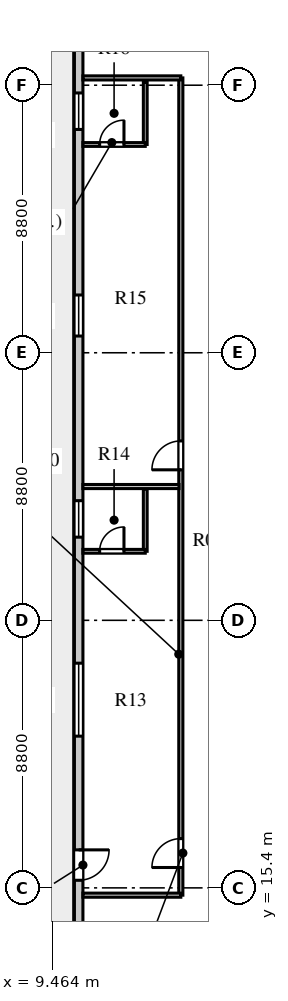
"""IFC4 building model, lengths in metres.
Left out: names, types, materials, properties, quantities, classifications, styles, units other than length and angle.
Written with IfcOpenShell. Run it as: python <this file> out.ifc"""

import sys

from ifc_helpers import new_model, si_unit, direction, frame, frame_2d, origin, place, context, subcontext, project, spatial, rectangle, extrude, element, fill, save


model = new_model("IFC4")
c1 = context("Model", 3, precision=1e-05, world=origin(), true_north=direction((0.0, 1.0)))
c2 = subcontext(c1, "Body", "Model", "MODEL_VIEW")
j1 = project(units=[si_unit("LENGTHUNIT", "METRE"), si_unit("PLANEANGLEUNIT", "RADIAN")], contexts=[c1])
p1 = place(None, origin())
s1 = spatial("IfcSite", under=j1, at=p1, CompositionType="ELEMENT")
p2 = place(p1, origin())
s2 = spatial("IfcBuilding", under=s1, at=p2, CompositionType="ELEMENT")
p3 = place(p2, frame((0.0, 0.0, 119.4)))
s3 = spatial("IfcBuildingStorey", under=s2, at=p3, CompositionType="ELEMENT", Elevation=119.4)
p4 = place(p3, frame((10.34, 43.87, 0.0), z_axis=(0.0, 0.0, 1.0), x_axis=(0.0, -1.0, 0.0)))
e1 = element("IfcWall", 1, at=p4, inside=s3, PredefinedType="STANDARD", context=c2, shape_type="SweptSolid", body=[
    extrude(rectangle(XDim=30.54, YDim=0.28, at=frame_2d((15.27, 0.0))), origin(), (0.0, 0.0, 1.0), 3.6),
])
p5 = place(p4, frame((27.22, 0.0, 0.0)))
e2 = element("IfcOpeningElement", 2, at=p5, cuts=e1, PredefinedType="OPENING", context=c2, shape_type="SweptSolid", body=[
    extrude(rectangle(XDim=1.0, YDim=2.05, at=frame_2d((0.5, 1.025))), frame((0.0, 0.15, 0.0), z_axis=(0.0, -1.0, 0.0), x_axis=(1.0, 0.0, 0.0)), (0.0, 0.0, 1.0), 0.3),
])
p6 = place(p4, frame((21.08, 0.0, 0.8)))
e3 = element("IfcOpeningElement", 3, at=p6, cuts=e1, PredefinedType="OPENING", context=c2, shape_type="SweptSolid", body=[
    extrude(rectangle(XDim=2.4, YDim=2.05, at=frame_2d((1.2, 1.025))), frame((0.0, 0.15, 0.0), z_axis=(0.0, -1.0, 0.0), x_axis=(1.0, 0.0, 0.0)), (0.0, 0.0, 1.0), 0.3),
])
p7 = place(p4, frame((15.735, 0.0, 0.8)))
e4 = element("IfcOpeningElement", 4, at=p7, cuts=e1, PredefinedType="OPENING", context=c2, shape_type="SweptSolid", body=[
    extrude(rectangle(XDim=1.2, YDim=1.75, at=frame_2d((0.6, 0.875))), frame((0.0, 0.15, 0.0), z_axis=(0.0, -1.0, 0.0), x_axis=(1.0, 0.0, 0.0)), (0.0, 0.0, 1.0), 0.3),
])
p8 = place(p4, frame((8.97, 0.0, 0.8)))
e5 = element("IfcOpeningElement", 5, at=p8, cuts=e1, PredefinedType="OPENING", context=c2, shape_type="SweptSolid", body=[
    extrude(rectangle(XDim=1.35, YDim=1.9, at=frame_2d((0.675, 0.95))), frame((0.0, 0.15, 0.0), z_axis=(0.0, -1.0, 0.0), x_axis=(1.0, 0.0, 0.0)), (0.0, 0.0, 1.0), 0.3),
])
p9 = place(p4, frame((2.325, 0.0, 0.8)))
e6 = element("IfcOpeningElement", 6, at=p9, cuts=e1, PredefinedType="OPENING", context=c2, shape_type="SweptSolid", body=[
    extrude(rectangle(XDim=1.2, YDim=1.75, at=frame_2d((0.6, 0.875))), frame((0.0, 0.15, 0.0), z_axis=(0.0, -1.0, 0.0), x_axis=(1.0, 0.0, 0.0)), (0.0, 0.0, 1.0), 0.3),
])
p10 = place(p3, frame((13.7, 15.16, 0.0), z_axis=(0.0, 0.0, 1.0), x_axis=(0.0, 1.0, 0.0)))
e7 = element("IfcWall", 7, at=p10, inside=s3, PredefinedType="PARTITIONING", context=c2, shape_type="SweptSolid", body=[
    extrude(rectangle(XDim=26.88, YDim=0.135, at=frame_2d((13.44, 0.0))), origin(), (0.0, 0.0, 1.0), 3.6),
])
p11 = place(p10, frame((0.91, 0.0, 0.0)))
e8 = element("IfcOpeningElement", 8, at=p11, cuts=e7, PredefinedType="OPENING", context=c2, shape_type="SweptSolid", body=[
    extrude(rectangle(XDim=0.95, YDim=2.1, at=frame_2d((0.475, 1.05))), frame((0.0, 0.078, 0.0), z_axis=(0.0, -1.0, 0.0), x_axis=(1.0, 0.0, 0.0)), (0.0, 0.0, 1.0), 0.155),
])
p12 = place(p10, frame((13.99, 0.0, 0.0)))
e9 = element("IfcOpeningElement", 9, at=p12, cuts=e7, PredefinedType="OPENING", context=c2, shape_type="SweptSolid", body=[
    extrude(rectangle(XDim=0.95, YDim=2.1, at=frame_2d((0.475, 1.05))), frame((0.0, 0.078, 0.0), z_axis=(0.0, -1.0, 0.0), x_axis=(1.0, 0.0, 0.0)), (0.0, 0.0, 1.0), 0.155),
])
for number, where, z_axis, x_axis in (
    (10, (10.48, 15.16, 0.0), (0.0, 0.0, 1.0), (1.0, 0.0, 0.0)),
    (11, (10.48, 42.04, 0.0), (0.0, 0.0, 1.0), (1.0, 0.0, 0.0)),
):
    element("IfcWall", number, at=place(p3, frame(where, z_axis=z_axis, x_axis=x_axis)), inside=s3, PredefinedType="PARTITIONING", context=c2, shape_type="SweptSolid", body=[
        extrude(rectangle(XDim=3.22, YDim=0.135, at=frame_2d((1.61, 0.0))), origin(), (0.0, 0.0, 1.0), 3.1),
    ])
p13 = place(p3, frame((12.53, 26.47, 0.0), z_axis=(0.0, 0.0, 1.0), x_axis=(0.0, 1.0, 0.0)))
e12 = element("IfcWall", 12, at=p13, inside=s3, PredefinedType="PLUMBINGWALL", context=c2, shape_type="SweptSolid", body=[
    extrude(rectangle(XDim=2.05, YDim=0.125, at=frame_2d((1.025, 0.0))), origin(), (0.0, 0.0, 1.0), 3.6),
])
p14 = place(p3, frame((10.48, 26.47, 0.0), z_axis=(0.0, 0.0, 1.0), x_axis=(1.0, 0.0, 0.0)))
e13 = element("IfcWall", 13, at=p14, inside=s3, PredefinedType="PLUMBINGWALL", context=c2, shape_type="SweptSolid", body=[
    extrude(rectangle(XDim=2.05, YDim=0.125, at=frame_2d((1.025, 0.0))), origin(), (0.0, 0.0, 1.0), 3.6),
])
p15 = place(p14, frame((0.55, 0.0, 0.0)))
e14 = element("IfcOpeningElement", 14, at=p15, cuts=e13, PredefinedType="OPENING", context=c2, shape_type="SweptSolid", body=[
    extrude(rectangle(XDim=0.8, YDim=2.05, at=frame_2d((0.4, 1.025))), frame((0.0, 0.073, 0.0), z_axis=(0.0, -1.0, 0.0), x_axis=(1.0, 0.0, 0.0)), (0.0, 0.0, 1.0), 0.145),
])
p16 = place(p3, frame((10.48, 28.6, 0.0), z_axis=(0.0, 0.0, 1.0), x_axis=(1.0, 0.0, 0.0)))
e15 = element("IfcWall", 15, at=p16, inside=s3, PredefinedType="PARTITIONING", context=c2, shape_type="SweptSolid", body=[
    extrude(rectangle(XDim=3.16, YDim=0.135, at=frame_2d((1.58, 0.0))), origin(), (0.0, 0.0, 1.0), 3.6),
])
p17 = place(p3, frame((12.53, 39.85, 0.0), z_axis=(0.0, 0.0, 1.0), x_axis=(0.0, 1.0, 0.0)))
e16 = element("IfcWall", 16, at=p17, inside=s3, PredefinedType="PLUMBINGWALL", context=c2, shape_type="SweptSolid", body=[
    extrude(rectangle(XDim=2.05, YDim=0.125, at=frame_2d((1.025, 0.0))), origin(), (0.0, 0.0, 1.0), 3.6),
])
p18 = place(p3, frame((10.48, 39.85, 0.0), z_axis=(0.0, 0.0, 1.0), x_axis=(1.0, 0.0, 0.0)))
e17 = element("IfcWall", 17, at=p18, inside=s3, PredefinedType="PLUMBINGWALL", context=c2, shape_type="SweptSolid", body=[
    extrude(rectangle(XDim=2.05, YDim=0.125, at=frame_2d((1.025, 0.0))), origin(), (0.0, 0.0, 1.0), 3.6),
])
p19 = place(p18, frame((0.55, 0.0, 0.0)))
e18 = element("IfcOpeningElement", 18, at=p19, cuts=e17, PredefinedType="OPENING", context=c2, shape_type="SweptSolid", body=[
    extrude(rectangle(XDim=0.8, YDim=2.05, at=frame_2d((0.4, 1.025))), frame((0.0, 0.073, 0.0), z_axis=(0.0, -1.0, 0.0), x_axis=(1.0, 0.0, 0.0)), (0.0, 0.0, 1.0), 0.145),
])
p20 = place(p5, frame((1.0, 0.0, 0.0), z_axis=(0.0, 0.0, 1.0), x_axis=(-1.0, 0.0, 0.0)))
e19 = element("IfcDoor", 19, at=p20, inside=s3, OperationType="SINGLE_SWING_RIGHT", PredefinedType="DOOR", context=c2, shape_type="SweptSolid", body=[
    extrude(rectangle(XDim=1.0, YDim=2.05, at=frame_2d((0.5, 1.025))), frame((0.0, 0.025, 0.0), z_axis=(0.0, -1.0, 0.0), x_axis=(1.0, 0.0, 0.0)), (0.0, 0.0, 1.0), 0.05),
])
fill(e2, e19)
p21 = place(p6, origin())
e20 = element("IfcWindow", 20, at=p21, inside=s3, PartitioningType="SINGLE_PANEL", PredefinedType="WINDOW", context=c2, shape_type="SweptSolid", body=[
    extrude(rectangle(XDim=2.4, YDim=2.05, at=frame_2d((1.2, 1.025))), frame((0.0, 0.03, 0.0), z_axis=(0.0, -1.0, 0.0), x_axis=(1.0, 0.0, 0.0)), (0.0, 0.0, 1.0), 0.06),
])
fill(e3, e20)
p22 = place(p7, origin())
e21 = element("IfcWindow", 21, at=p22, inside=s3, PartitioningType="SINGLE_PANEL", PredefinedType="WINDOW", context=c2, shape_type="SweptSolid", body=[
    extrude(rectangle(XDim=1.2, YDim=1.75, at=frame_2d((0.6, 0.875))), frame((0.0, 0.03, 0.0), z_axis=(0.0, -1.0, 0.0), x_axis=(1.0, 0.0, 0.0)), (0.0, 0.0, 1.0), 0.06),
])
fill(e4, e21)
p23 = place(p8, origin())
e22 = element("IfcWindow", 22, at=p23, inside=s3, PartitioningType="SINGLE_PANEL", PredefinedType="WINDOW", context=c2, shape_type="SweptSolid", body=[
    extrude(rectangle(XDim=1.35, YDim=1.9, at=frame_2d((0.675, 0.95))), frame((0.0, 0.03, 0.0), z_axis=(0.0, -1.0, 0.0), x_axis=(1.0, 0.0, 0.0)), (0.0, 0.0, 1.0), 0.06),
])
fill(e5, e22)
p24 = place(p9, origin())
e23 = element("IfcWindow", 23, at=p24, inside=s3, PartitioningType="SINGLE_PANEL", PredefinedType="WINDOW", context=c2, shape_type="SweptSolid", body=[
    extrude(rectangle(XDim=1.2, YDim=1.75, at=frame_2d((0.6, 0.875))), frame((0.0, 0.03, 0.0), z_axis=(0.0, -1.0, 0.0), x_axis=(1.0, 0.0, 0.0)), (0.0, 0.0, 1.0), 0.06),
])
fill(e6, e23)
p25 = place(p11, origin())
e24 = element("IfcDoor", 24, at=p25, inside=s3, OperationType="SINGLE_SWING_LEFT", PredefinedType="DOOR", context=c2, shape_type="SweptSolid", body=[
    extrude(rectangle(XDim=0.95, YDim=2.1, at=frame_2d((0.475, 1.05))), frame((0.0, 0.025, 0.0), z_axis=(0.0, -1.0, 0.0), x_axis=(1.0, 0.0, 0.0)), (0.0, 0.0, 1.0), 0.05),
])
fill(e8, e24)
p26 = place(p15, frame((0.8, 0.0, 0.0), z_axis=(0.0, 0.0, 1.0), x_axis=(-1.0, 0.0, 0.0)))
e25 = element("IfcDoor", 25, at=p26, inside=s3, OperationType="SINGLE_SWING_LEFT", PredefinedType="DOOR", context=c2, shape_type="SweptSolid", body=[
    extrude(rectangle(XDim=0.8, YDim=2.05, at=frame_2d((0.4, 1.025))), frame((0.0, 0.025, 0.0), z_axis=(0.0, -1.0, 0.0), x_axis=(1.0, 0.0, 0.0)), (0.0, 0.0, 1.0), 0.05),
])
fill(e14, e25)
p27 = place(p12, origin())
e26 = element("IfcDoor", 26, at=p27, inside=s3, OperationType="SINGLE_SWING_LEFT", PredefinedType="DOOR", context=c2, shape_type="SweptSolid", body=[
    extrude(rectangle(XDim=0.95, YDim=2.1, at=frame_2d((0.475, 1.05))), frame((0.0, 0.025, 0.0), z_axis=(0.0, -1.0, 0.0), x_axis=(1.0, 0.0, 0.0)), (0.0, 0.0, 1.0), 0.05),
])
fill(e9, e26)
p28 = place(p19, frame((0.8, 0.0, 0.0), z_axis=(0.0, 0.0, 1.0), x_axis=(-1.0, 0.0, 0.0)))
e27 = element("IfcDoor", 27, at=p28, inside=s3, OperationType="SINGLE_SWING_LEFT", PredefinedType="DOOR", context=c2, shape_type="SweptSolid", body=[
    extrude(rectangle(XDim=0.8, YDim=2.05, at=frame_2d((0.4, 1.025))), frame((0.0, 0.025, 0.0), z_axis=(0.0, -1.0, 0.0), x_axis=(1.0, 0.0, 0.0)), (0.0, 0.0, 1.0), 0.05),
])
fill(e18, e27)
save(model, sys.argv[1])
